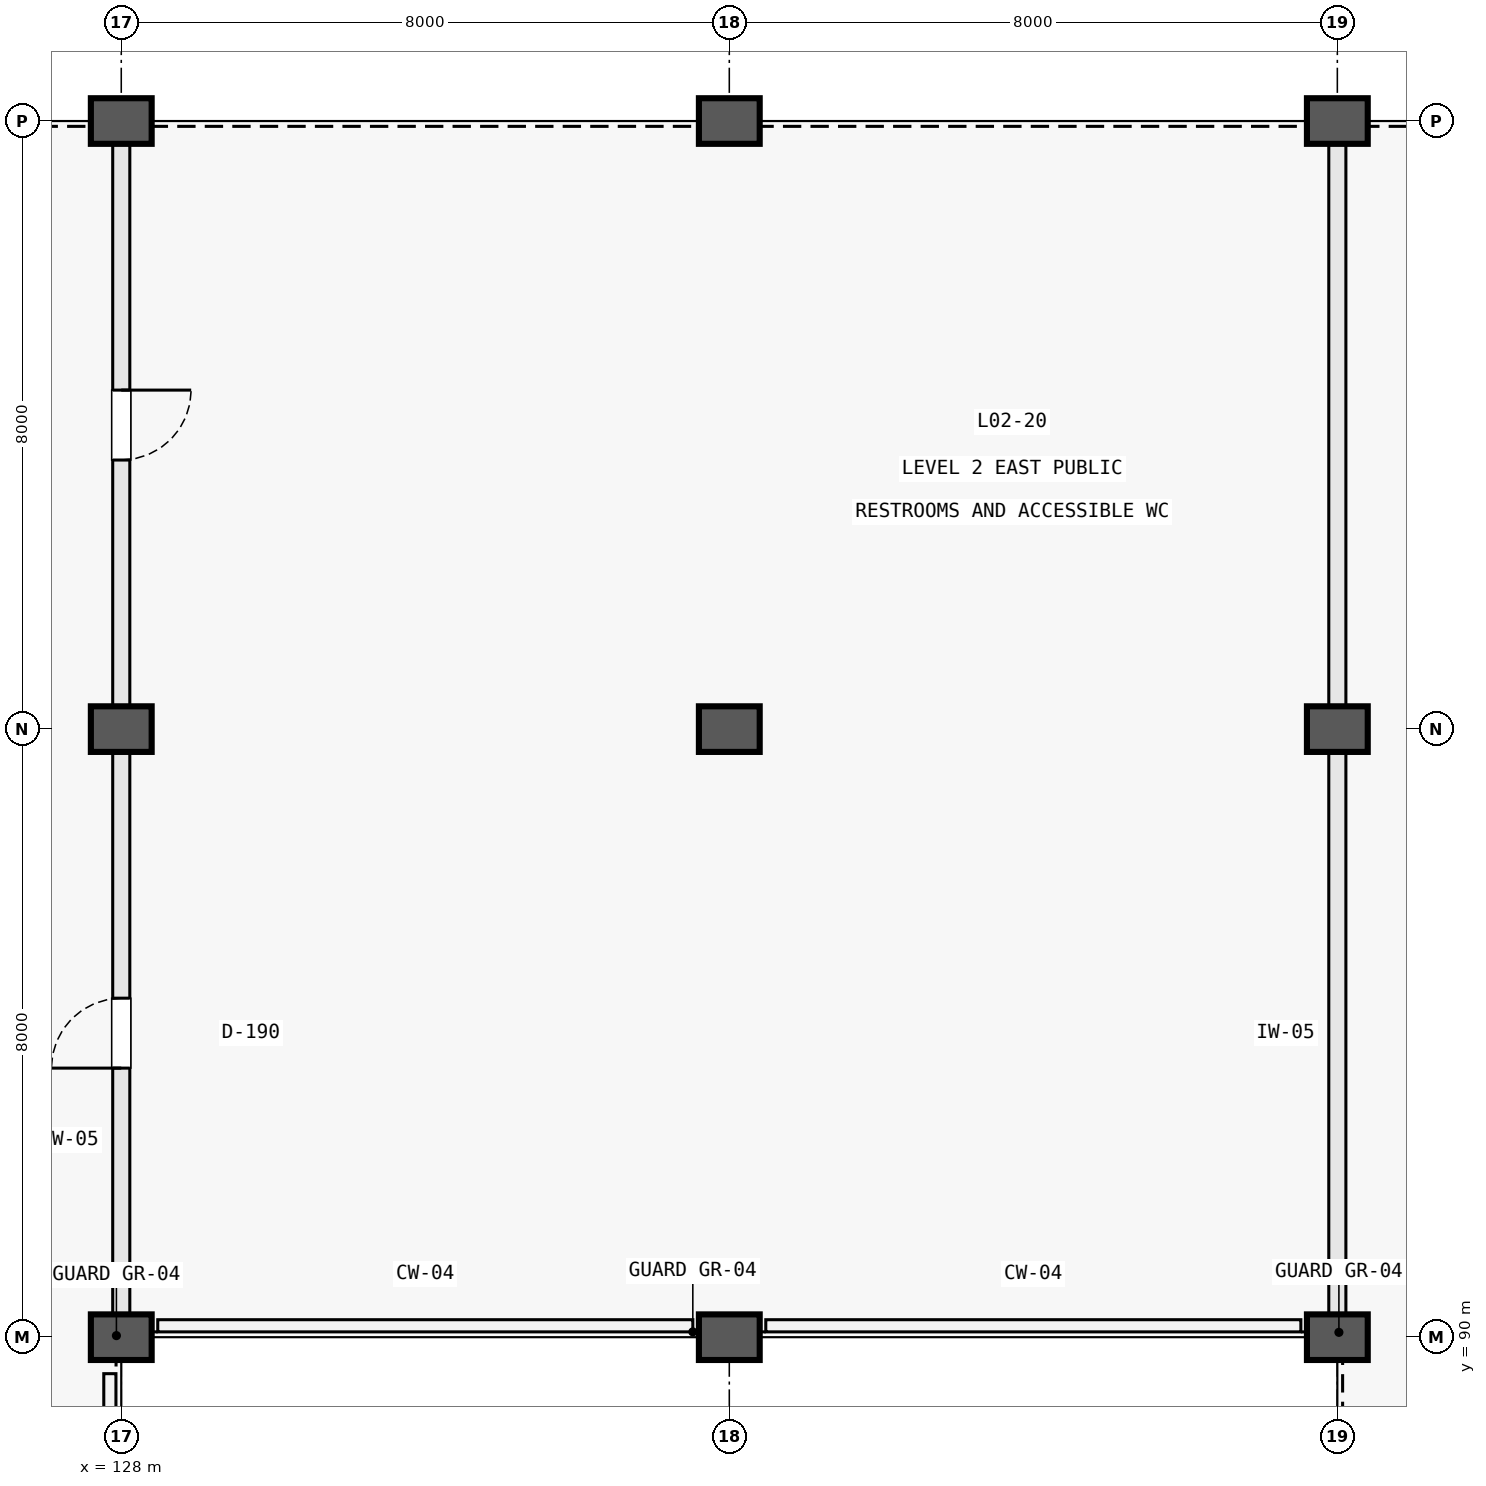
"""IFC4 building model, lengths in metres.
Left out: names, types, materials, properties, quantities, classifications, styles, units other than length and angle.
Written with IfcOpenShell. Run it as: python <this file> out.ifc"""

import sys

from ifc_helpers import new_model, si_unit, direction, frame, frame_2d, origin, origin_2d, place, context, subcontext, project, spatial, rectangle, extrude, element, fill, save


model = new_model("IFC4")
c1 = context("Model", 3, precision=1e-05, world=origin(), true_north=direction((0.0, 1.0)))
c2 = subcontext(c1, "Body", "Model", "MODEL_VIEW")
j1 = project(units=[si_unit("LENGTHUNIT", "METRE"), si_unit("PLANEANGLEUNIT", "RADIAN")], contexts=[c1])
p1 = place(None, origin())
s1 = spatial("IfcSite", under=j1, at=p1, CompositionType="ELEMENT")
p2 = place(p1, origin())
s2 = spatial("IfcBuilding", under=s1, at=p2, CompositionType="ELEMENT")
p3 = place(p2, frame((0.0, 0.0, 5.4)))
s3 = spatial("IfcBuildingStorey", under=s2, at=p3, CompositionType="ELEMENT", Elevation=5.4)
for number, where, z_axis, x_axis in (
    (1, (128.0, 90.0, 0.0), (0.0, 0.0, 1.0), (1.0, 0.0, 0.0)),
    (2, (128.0, 98.0, 0.0), (0.0, 0.0, 1.0), (1.0, 0.0, 0.0)),
    (3, (128.0, 106.0, 0.0), (0.0, 0.0, 1.0), (1.0, 0.0, 0.0)),
    (4, (136.0, 90.0, 0.0), (0.0, 0.0, 1.0), (1.0, 0.0, 0.0)),
    (5, (136.0, 98.0, 0.0), (0.0, 0.0, 1.0), (1.0, 0.0, 0.0)),
    (6, (136.0, 106.0, 0.0), (0.0, 0.0, 1.0), (1.0, 0.0, 0.0)),
    (7, (144.0, 90.0, 0.0), (0.0, 0.0, 1.0), (1.0, 0.0, 0.0)),
    (8, (144.0, 98.0, 0.0), (0.0, 0.0, 1.0), (1.0, 0.0, 0.0)),
    (9, (144.0, 106.0, 0.0), (0.0, 0.0, 1.0), (1.0, 0.0, 0.0)),
):
    element("IfcColumn", number, at=place(p3, frame(where, z_axis=z_axis, x_axis=x_axis)), inside=s3, PredefinedType="COLUMN", context=c2, shape_type="SweptSolid", body=[
        extrude(rectangle(XDim=0.8, YDim=0.6, at=origin_2d()), origin(), (0.0, 0.0, 1.0), 5.1),
    ])
p4 = place(p3, frame((128.0, 90.31, 0.0), z_axis=(0.0, 0.0, 1.0), x_axis=(0.0, 1.0, 0.0)))
e10 = element("IfcWall", 10, at=p4, inside=s3, PredefinedType="PARTITIONING", context=c2, shape_type="SweptSolid", body=[
    extrude(rectangle(XDim=7.38, YDim=0.225, at=frame_2d((3.69, 0.0))), origin(), (0.0, 0.0, 1.0), 3.61),
])
p5 = place(p4, frame((3.23, 0.0, 0.0)))
e11 = element("IfcOpeningElement", 11, at=p5, cuts=e10, PredefinedType="OPENING", context=c2, shape_type="SweptSolid", body=[
    extrude(rectangle(XDim=0.92, YDim=2.1, at=frame_2d((0.46, 1.05))), frame((0.0, 0.125, 0.0), z_axis=(0.0, -1.0, 0.0), x_axis=(1.0, 0.0, 0.0)), (0.0, 0.0, 1.0), 0.249),
])
p6 = place(p3, frame((128.0, 98.31, 0.0), z_axis=(0.0, 0.0, 1.0), x_axis=(0.0, 1.0, 0.0)))
e12 = element("IfcWall", 12, at=p6, inside=s3, PredefinedType="PARTITIONING", context=c2, shape_type="SweptSolid", body=[
    extrude(rectangle(XDim=7.38, YDim=0.225, at=frame_2d((3.69, 0.0))), origin(), (0.0, 0.0, 1.0), 3.61),
])
p7 = place(p6, frame((3.23, 0.0, 0.0)))
e13 = element("IfcOpeningElement", 13, at=p7, cuts=e12, PredefinedType="OPENING", context=c2, shape_type="SweptSolid", body=[
    extrude(rectangle(XDim=0.92, YDim=2.1, at=frame_2d((0.46, 1.05))), frame((0.0, 0.125, 0.0), z_axis=(0.0, -1.0, 0.0), x_axis=(1.0, 0.0, 0.0)), (0.0, 0.0, 1.0), 0.249),
])
for number, where, z_axis, x_axis in (
    (14, (144.0, 90.31, 0.0), (0.0, 0.0, 1.0), (0.0, 1.0, 0.0)),
    (15, (144.0, 98.31, 0.0), (0.0, 0.0, 1.0), (0.0, 1.0, 0.0)),
):
    element("IfcWall", number, at=place(p3, frame(where, z_axis=z_axis, x_axis=x_axis)), inside=s3, PredefinedType="PARTITIONING", context=c2, shape_type="SweptSolid", body=[
        extrude(rectangle(XDim=7.38, YDim=0.225, at=frame_2d((3.69, 0.0))), origin(), (0.0, 0.0, 1.0), 3.61),
    ])
p8 = place(p5, origin())
e16 = element("IfcDoor", 16, at=p8, inside=s3, OperationType="SINGLE_SWING_LEFT", PredefinedType="DOOR", context=c2, shape_type="SweptSolid", body=[
    extrude(rectangle(XDim=0.92, YDim=2.1, at=frame_2d((0.46, 1.05))), frame((0.0, 0.025, 0.0), z_axis=(0.0, -1.0, 0.0), x_axis=(1.0, 0.0, 0.0)), (0.0, 0.0, 1.0), 0.05),
])
fill(e11, e16)
p9 = place(p7, frame((0.92, 0.0, 0.0), z_axis=(0.0, 0.0, 1.0), x_axis=(-1.0, 0.0, 0.0)))
e17 = element("IfcDoor", 17, at=p9, inside=s3, OperationType="SINGLE_SWING_RIGHT", PredefinedType="DOOR", context=c2, shape_type="SweptSolid", body=[
    extrude(rectangle(XDim=0.92, YDim=2.1, at=frame_2d((0.46, 1.05))), frame((0.0, 0.025, 0.0), z_axis=(0.0, -1.0, 0.0), x_axis=(1.0, 0.0, 0.0)), (0.0, 0.0, 1.0), 0.05),
])
fill(e13, e17)
save(model, sys.argv[1])
